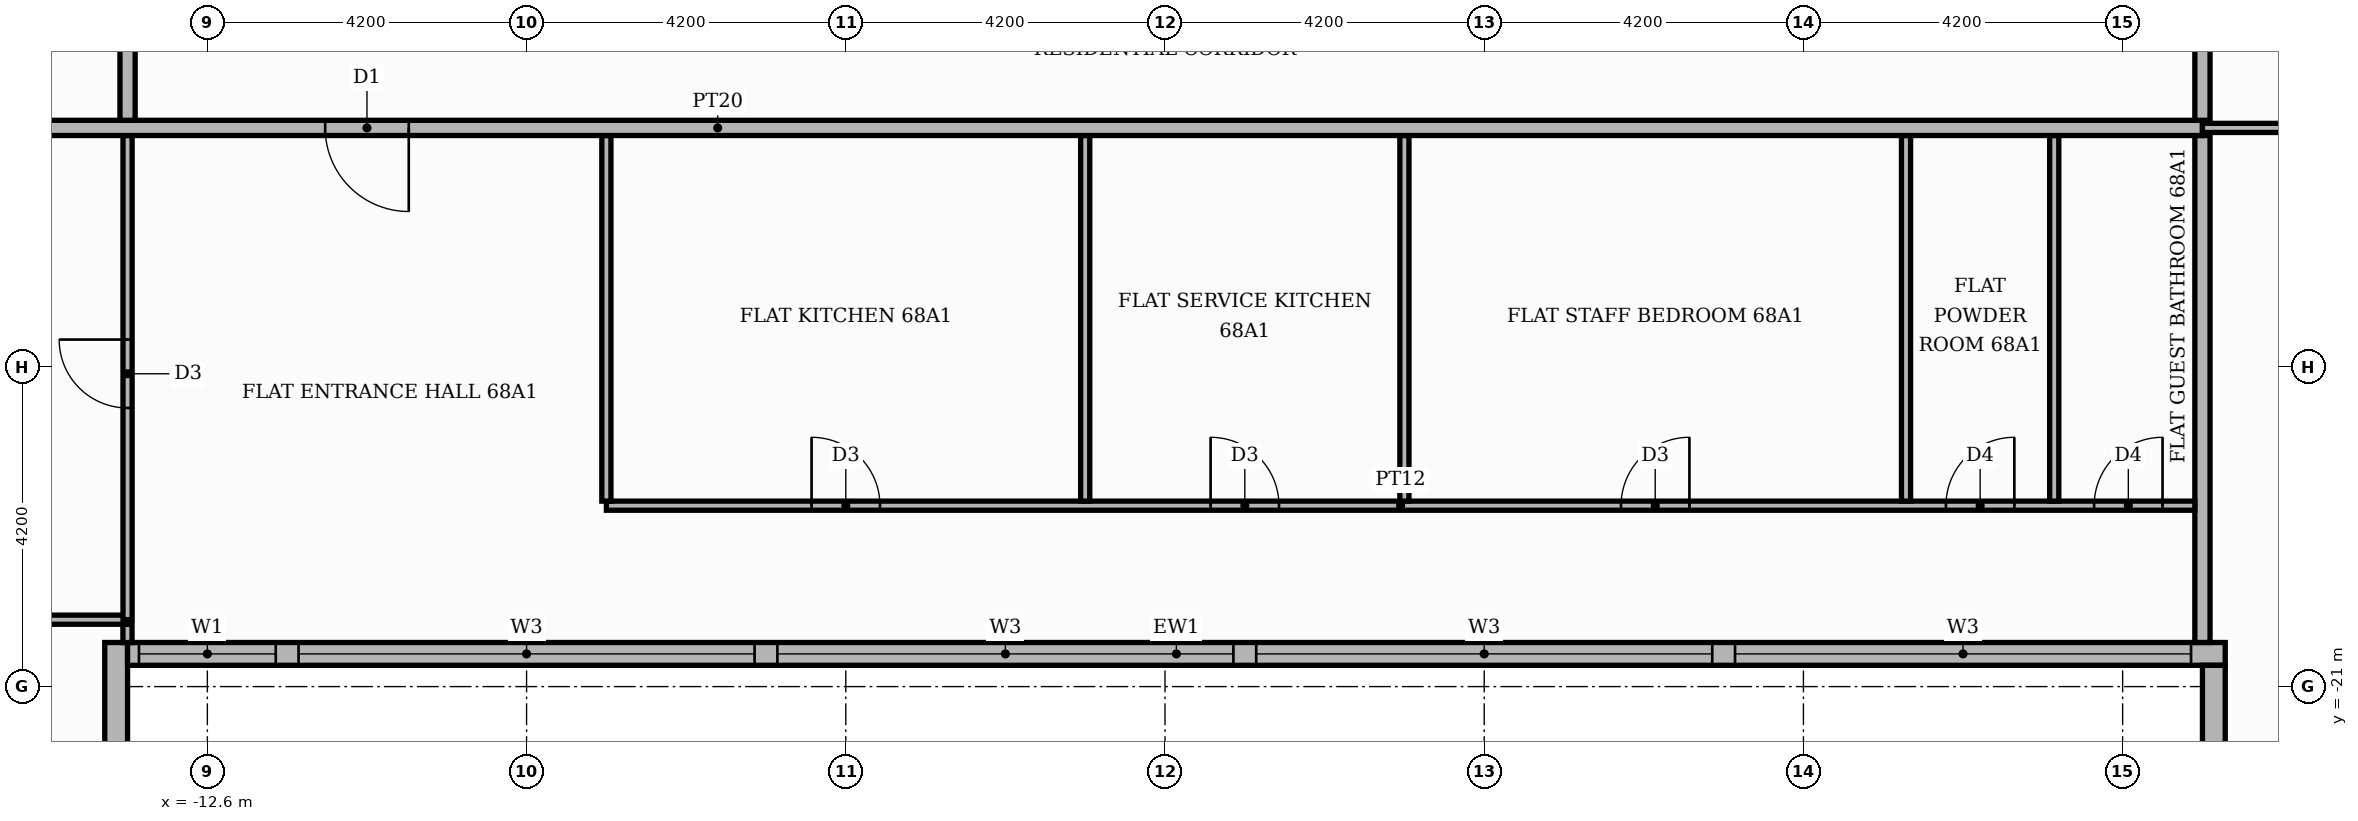
"""IFC4 building model, lengths in metres.
Left out: names, types, materials, properties, quantities, classifications, styles, units other than length and angle.
Written with IfcOpenShell. Run it as: python <this file> out.ifc"""

import sys

from ifc_helpers import new_model, si_unit, direction, frame, frame_2d, origin, place, context, subcontext, project, spatial, rectangle, extrude, element, fill, save


model = new_model("IFC4")
c1 = context("Model", 3, precision=1e-05, world=origin(), true_north=direction((0.0, 1.0)))
c2 = subcontext(c1, "Body", "Model", "MODEL_VIEW")
j1 = project(units=[si_unit("LENGTHUNIT", "METRE"), si_unit("PLANEANGLEUNIT", "RADIAN")], contexts=[c1])
p1 = place(None, origin())
s1 = spatial("IfcSite", under=j1, at=p1, CompositionType="ELEMENT")
p2 = place(p1, origin())
s2 = spatial("IfcBuilding", under=s1, at=p2, CompositionType="ELEMENT")
p3 = place(p2, frame((0.0, 0.0, 283.5)))
s3 = spatial("IfcBuildingStorey", under=s2, at=p3, CompositionType="ELEMENT", Elevation=283.5)
p4 = place(p3, frame((-13.8, -25.42, 0.0), z_axis=(0.0, 0.0, 1.0), x_axis=(0.0, 1.0, 0.0)))
e1 = element("IfcWall", 1, at=p4, inside=s3, PredefinedType="STANDARD", context=c2, shape_type="SweptSolid", body=[
    extrude(rectangle(XDim=5.0, YDim=0.3, at=frame_2d((2.5, 0.0))), origin(), (0.0, 0.0, 1.0), 3.4),
])
p5 = place(p4, frame((1.42, 0.0, 0.9)))
e2 = element("IfcOpeningElement", 2, at=p5, cuts=e1, PredefinedType="OPENING", context=c2, shape_type="SweptSolid", body=[
    extrude(rectangle(XDim=1.8, YDim=2.1, at=frame_2d((0.9, 1.05))), frame((0.0, 0.16, 0.0), z_axis=(0.0, -1.0, 0.0), x_axis=(1.0, 0.0, 0.0)), (0.0, 0.0, 1.0), 0.32),
])
p6 = place(p3, frame((-13.65, -20.57, 0.0), z_axis=(0.0, 0.0, 1.0), x_axis=(1.0, 0.0, 0.0)))
e3 = element("IfcWall", 3, at=p6, inside=s3, PredefinedType="STANDARD", context=c2, shape_type="SweptSolid", body=[
    extrude(rectangle(XDim=27.6, YDim=0.3, at=frame_2d((13.8, 0.0))), origin(), (0.0, 0.0, 1.0), 3.4),
])
p7 = place(p6, frame((0.15, 0.0, 0.9)))
e4 = element("IfcOpeningElement", 4, at=p7, cuts=e3, PredefinedType="OPENING", context=c2, shape_type="SweptSolid", body=[
    extrude(rectangle(XDim=1.8, YDim=2.1, at=frame_2d((0.9, 1.05))), frame((0.0, 0.16, 0.0), z_axis=(0.0, -1.0, 0.0), x_axis=(1.0, 0.0, 0.0)), (0.0, 0.0, 1.0), 0.32),
])
p8 = place(p6, frame((2.25, 0.0, 0.9)))
e5 = element("IfcOpeningElement", 5, at=p8, cuts=e3, PredefinedType="OPENING", context=c2, shape_type="SweptSolid", body=[
    extrude(rectangle(XDim=6.0, YDim=2.1, at=frame_2d((3.0, 1.05))), frame((0.0, 0.16, 0.0), z_axis=(0.0, -1.0, 0.0), x_axis=(1.0, 0.0, 0.0)), (0.0, 0.0, 1.0), 0.32),
])
p9 = place(p6, frame((8.55, 0.0, 0.9)))
e6 = element("IfcOpeningElement", 6, at=p9, cuts=e3, PredefinedType="OPENING", context=c2, shape_type="SweptSolid", body=[
    extrude(rectangle(XDim=6.0, YDim=2.1, at=frame_2d((3.0, 1.05))), frame((0.0, 0.16, 0.0), z_axis=(0.0, -1.0, 0.0), x_axis=(1.0, 0.0, 0.0)), (0.0, 0.0, 1.0), 0.32),
])
p10 = place(p6, frame((14.85, 0.0, 0.9)))
e7 = element("IfcOpeningElement", 7, at=p10, cuts=e3, PredefinedType="OPENING", context=c2, shape_type="SweptSolid", body=[
    extrude(rectangle(XDim=6.0, YDim=2.1, at=frame_2d((3.0, 1.05))), frame((0.0, 0.16, 0.0), z_axis=(0.0, -1.0, 0.0), x_axis=(1.0, 0.0, 0.0)), (0.0, 0.0, 1.0), 0.32),
])
p11 = place(p6, frame((21.15, 0.0, 0.9)))
e8 = element("IfcOpeningElement", 8, at=p11, cuts=e3, PredefinedType="OPENING", context=c2, shape_type="SweptSolid", body=[
    extrude(rectangle(XDim=6.0, YDim=2.1, at=frame_2d((3.0, 1.05))), frame((0.0, 0.16, 0.0), z_axis=(0.0, -1.0, 0.0), x_axis=(1.0, 0.0, 0.0)), (0.0, 0.0, 1.0), 0.32),
])
p12 = place(p3, frame((13.8, -20.72, 0.0), z_axis=(0.0, 0.0, 1.0), x_axis=(0.0, -1.0, 0.0)))
e9 = element("IfcWall", 9, at=p12, inside=s3, PredefinedType="STANDARD", context=c2, shape_type="SweptSolid", body=[
    extrude(rectangle(XDim=5.0, YDim=0.3, at=frame_2d((2.5, 0.0))), origin(), (0.0, 0.0, 1.0), 3.4),
])
p13 = place(p12, frame((1.48, 0.0, 0.9)))
e10 = element("IfcOpeningElement", 10, at=p13, cuts=e9, PredefinedType="OPENING", context=c2, shape_type="SweptSolid", body=[
    extrude(rectangle(XDim=1.8, YDim=2.1, at=frame_2d((0.9, 1.05))), frame((0.0, 0.16, 0.0), z_axis=(0.0, -1.0, 0.0), x_axis=(1.0, 0.0, 0.0)), (0.0, 0.0, 1.0), 0.32),
])
p14 = place(p3, frame((-13.651, -20.421, 0.0), z_axis=(0.0, 0.0, 1.0), x_axis=(0.0, 1.0, 0.0)))
e11 = element("IfcWall", 11, at=p14, inside=s3, PredefinedType="PARTITIONING", context=c2, shape_type="SweptSolid", body=[
    extrude(rectangle(XDim=0.241, YDim=0.12, at=frame_2d((0.121, 0.0))), origin(), (0.0, 0.0, 1.0), 3.4),
])
p15 = place(p3, frame((13.65, -20.42, 0.0), z_axis=(0.0, 0.0, 1.0), x_axis=(0.0, 1.0, 0.0)))
e12 = element("IfcWall", 12, at=p15, inside=s3, PredefinedType="PARTITIONING", context=c2, shape_type="SweptSolid", body=[
    extrude(rectangle(XDim=6.67, YDim=0.2, at=frame_2d((3.335, 0.0))), origin(), (0.0, 0.0, 1.0), 3.4),
])
p16 = place(p3, frame((-20.719, -20.12, 0.0), z_axis=(0.0, 0.0, 1.0), x_axis=(1.0, 0.0, 0.0)))
e13 = element("IfcWall", 13, at=p16, inside=s3, PredefinedType="PARTITIONING", context=c2, shape_type="SweptSolid", body=[
    extrude(rectangle(XDim=7.068, YDim=0.12, at=frame_2d((3.534, 0.0))), origin(), (0.0, 0.0, 1.0), 3.4),
])
p17 = place(p16, frame((4.094, 0.0, 0.0)))
e14 = element("IfcOpeningElement", 14, at=p17, cuts=e13, PredefinedType="OPENING", context=c2, shape_type="SweptSolid", body=[
    extrude(rectangle(XDim=1.0, YDim=2.1, at=frame_2d((0.5, 1.05))), frame((0.0, 0.07, 0.0), z_axis=(0.0, -1.0, 0.0), x_axis=(1.0, 0.0, 0.0)), (0.0, 0.0, 1.0), 0.14),
])
p18 = place(p3, frame((-13.65, -20.119, 0.0), z_axis=(0.0, 0.0, 1.0), x_axis=(0.0, 1.0, 0.0)))
e15 = element("IfcWall", 15, at=p18, inside=s3, PredefinedType="PARTITIONING", context=c2, shape_type="SweptSolid", body=[
    extrude(rectangle(XDim=6.369, YDim=0.12, at=frame_2d((3.185, 0.0))), origin(), (0.0, 0.0, 1.0), 3.4),
])
p19 = place(p18, frame((2.784, 0.0, 0.0)))
e16 = element("IfcOpeningElement", 16, at=p19, cuts=e15, PredefinedType="OPENING", context=c2, shape_type="SweptSolid", body=[
    extrude(rectangle(XDim=0.9, YDim=2.1, at=frame_2d((0.45, 1.05))), frame((0.0, 0.07, 0.0), z_axis=(0.0, -1.0, 0.0), x_axis=(1.0, 0.0, 0.0)), (0.0, 0.0, 1.0), 0.14),
])
p20 = place(p3, frame((-7.35, -18.62, 0.0), z_axis=(0.0, 0.0, 1.0), x_axis=(1.0, 0.0, 0.0)))
e17 = element("IfcWall", 17, at=p20, inside=s3, PredefinedType="PARTITIONING", context=c2, shape_type="SweptSolid", body=[
    extrude(rectangle(XDim=20.9, YDim=0.12, at=frame_2d((10.45, 0.0))), origin(), (0.0, 0.0, 1.0), 3.4),
])
p21 = place(p20, frame((2.7, 0.0, 0.0)))
e18 = element("IfcOpeningElement", 18, at=p21, cuts=e17, PredefinedType="OPENING", context=c2, shape_type="SweptSolid", body=[
    extrude(rectangle(XDim=0.9, YDim=2.1, at=frame_2d((0.45, 1.05))), frame((0.0, 0.07, 0.0), z_axis=(0.0, -1.0, 0.0), x_axis=(1.0, 0.0, 0.0)), (0.0, 0.0, 1.0), 0.14),
])
p22 = place(p20, frame((7.95, 0.0, 0.0)))
e19 = element("IfcOpeningElement", 19, at=p22, cuts=e17, PredefinedType="OPENING", context=c2, shape_type="SweptSolid", body=[
    extrude(rectangle(XDim=0.9, YDim=2.1, at=frame_2d((0.45, 1.05))), frame((0.0, 0.07, 0.0), z_axis=(0.0, -1.0, 0.0), x_axis=(1.0, 0.0, 0.0)), (0.0, 0.0, 1.0), 0.14),
])
p23 = place(p20, frame((13.35, 0.0, 0.0)))
e20 = element("IfcOpeningElement", 20, at=p23, cuts=e17, PredefinedType="OPENING", context=c2, shape_type="SweptSolid", body=[
    extrude(rectangle(XDim=0.9, YDim=2.1, at=frame_2d((0.45, 1.05))), frame((0.0, 0.07, 0.0), z_axis=(0.0, -1.0, 0.0), x_axis=(1.0, 0.0, 0.0)), (0.0, 0.0, 1.0), 0.14),
])
p24 = place(p20, frame((17.625, 0.0, 0.0)))
e21 = element("IfcOpeningElement", 21, at=p24, cuts=e17, PredefinedType="OPENING", context=c2, shape_type="SweptSolid", body=[
    extrude(rectangle(XDim=0.9, YDim=2.1, at=frame_2d((0.45, 1.05))), frame((0.0, 0.07, 0.0), z_axis=(0.0, -1.0, 0.0), x_axis=(1.0, 0.0, 0.0)), (0.0, 0.0, 1.0), 0.14),
])
p25 = place(p20, frame((19.575, 0.0, 0.0)))
e22 = element("IfcOpeningElement", 22, at=p25, cuts=e17, PredefinedType="OPENING", context=c2, shape_type="SweptSolid", body=[
    extrude(rectangle(XDim=0.9, YDim=2.1, at=frame_2d((0.45, 1.05))), frame((0.0, 0.07, 0.0), z_axis=(0.0, -1.0, 0.0), x_axis=(1.0, 0.0, 0.0)), (0.0, 0.0, 1.0), 0.14),
])
for number, where, z_axis, x_axis in (
    (23, (-7.35, -18.56, 0.0), (0.0, 0.0, 1.0), (0.0, 1.0, 0.0)),
    (24, (-1.05, -18.56, 0.0), (0.0, 0.0, 1.0), (0.0, 1.0, 0.0)),
    (25, (3.15, -18.56, 0.0), (0.0, 0.0, 1.0), (0.0, 1.0, 0.0)),
    (26, (9.75, -18.56, 0.0), (0.0, 0.0, 1.0), (0.0, 1.0, 0.0)),
    (27, (11.7, -18.56, 0.0), (0.0, 0.0, 1.0), (0.0, 1.0, 0.0)),
):
    element("IfcWall", number, at=place(p3, frame(where, z_axis=z_axis, x_axis=x_axis)), inside=s3, PredefinedType="PARTITIONING", context=c2, shape_type="SweptSolid", body=[
        extrude(rectangle(XDim=4.81, YDim=0.12, at=frame_2d((2.405, 0.0))), origin(), (0.0, 0.0, 1.0), 3.4),
    ])
p26 = place(p3, frame((-25.42, -13.65, 0.0), z_axis=(0.0, 0.0, 1.0), x_axis=(1.0, 0.0, 0.0)))
e28 = element("IfcWall", 28, at=p26, inside=s3, PredefinedType="PARTITIONING", context=c2, shape_type="SweptSolid", body=[
    extrude(rectangle(XDim=39.07, YDim=0.2, at=frame_2d((19.535, 0.0))), origin(), (0.0, 0.0, 1.0), 3.4),
])
p27 = place(p26, frame((14.37, 0.0, 0.0)))
e29 = element("IfcOpeningElement", 29, at=p27, cuts=e28, PredefinedType="OPENING", context=c2, shape_type="SweptSolid", body=[
    extrude(rectangle(XDim=1.1, YDim=2.4, at=frame_2d((0.55, 1.2))), frame((0.0, 0.11, 0.0), z_axis=(0.0, -1.0, 0.0), x_axis=(1.0, 0.0, 0.0)), (0.0, 0.0, 1.0), 0.22),
])
p28 = place(p3, frame((13.65, -13.65, 0.0), z_axis=(0.0, 0.0, 1.0), x_axis=(1.0, 0.0, 0.0)))
e30 = element("IfcWall", 30, at=p28, inside=s3, PredefinedType="PARTITIONING", context=c2, shape_type="SweptSolid", body=[
    extrude(rectangle(XDim=6.77, YDim=0.12, at=frame_2d((3.385, 0.0))), origin(), (0.0, 0.0, 1.0), 3.4),
])
p29 = place(p28, frame((2.885, 0.0, 0.0)))
e31 = element("IfcOpeningElement", 31, at=p29, cuts=e30, PredefinedType="OPENING", context=c2, shape_type="SweptSolid", body=[
    extrude(rectangle(XDim=1.0, YDim=2.1, at=frame_2d((0.5, 1.05))), frame((0.0, 0.07, 0.0), z_axis=(0.0, -1.0, 0.0), x_axis=(1.0, 0.0, 0.0)), (0.0, 0.0, 1.0), 0.14),
])
for number, where, z_axis, x_axis in (
    (32, (-13.65, -13.55, 0.0), (0.0, 0.0, 1.0), (0.0, 1.0, 0.0)),
    (33, (13.65, -13.55, 0.0), (0.0, 0.0, 1.0), (0.0, 1.0, 0.0)),
):
    element("IfcWall", number, at=place(p3, frame(where, z_axis=z_axis, x_axis=x_axis)), inside=s3, PredefinedType="PARTITIONING", context=c2, shape_type="SweptSolid", body=[
        extrude(rectangle(XDim=2.45, YDim=0.2, at=frame_2d((1.225, 0.0))), origin(), (0.0, 0.0, 1.0), 3.4),
    ])
p30 = place(p7, origin())
e34 = element("IfcWindow", 34, at=p30, inside=s3, PartitioningType="SINGLE_PANEL", PredefinedType="WINDOW", context=c2, shape_type="SweptSolid", body=[
    extrude(rectangle(XDim=1.8, YDim=2.1, at=frame_2d((0.9, 1.05))), frame((0.0, 0.03, 0.0), z_axis=(0.0, -1.0, 0.0), x_axis=(1.0, 0.0, 0.0)), (0.0, 0.0, 1.0), 0.06),
])
fill(e4, e34)
p31 = place(p8, origin())
e35 = element("IfcWindow", 35, at=p31, inside=s3, PartitioningType="SINGLE_PANEL", PredefinedType="WINDOW", context=c2, shape_type="SweptSolid", body=[
    extrude(rectangle(XDim=6.0, YDim=2.1, at=frame_2d((3.0, 1.05))), frame((0.0, 0.03, 0.0), z_axis=(0.0, -1.0, 0.0), x_axis=(1.0, 0.0, 0.0)), (0.0, 0.0, 1.0), 0.06),
])
fill(e5, e35)
p32 = place(p9, origin())
e36 = element("IfcWindow", 36, at=p32, inside=s3, PartitioningType="SINGLE_PANEL", PredefinedType="WINDOW", context=c2, shape_type="SweptSolid", body=[
    extrude(rectangle(XDim=6.0, YDim=2.1, at=frame_2d((3.0, 1.05))), frame((0.0, 0.03, 0.0), z_axis=(0.0, -1.0, 0.0), x_axis=(1.0, 0.0, 0.0)), (0.0, 0.0, 1.0), 0.06),
])
fill(e6, e36)
p33 = place(p10, origin())
e37 = element("IfcWindow", 37, at=p33, inside=s3, PartitioningType="SINGLE_PANEL", PredefinedType="WINDOW", context=c2, shape_type="SweptSolid", body=[
    extrude(rectangle(XDim=6.0, YDim=2.1, at=frame_2d((3.0, 1.05))), frame((0.0, 0.03, 0.0), z_axis=(0.0, -1.0, 0.0), x_axis=(1.0, 0.0, 0.0)), (0.0, 0.0, 1.0), 0.06),
])
fill(e7, e37)
p34 = place(p11, origin())
e38 = element("IfcWindow", 38, at=p34, inside=s3, PartitioningType="SINGLE_PANEL", PredefinedType="WINDOW", context=c2, shape_type="SweptSolid", body=[
    extrude(rectangle(XDim=6.0, YDim=2.1, at=frame_2d((3.0, 1.05))), frame((0.0, 0.03, 0.0), z_axis=(0.0, -1.0, 0.0), x_axis=(1.0, 0.0, 0.0)), (0.0, 0.0, 1.0), 0.06),
])
fill(e8, e38)
p35 = place(p27, frame((1.1, 0.0, 0.0), z_axis=(0.0, 0.0, 1.0), x_axis=(-1.0, 0.0, 0.0)))
e39 = element("IfcDoor", 39, at=p35, inside=s3, OperationType="SINGLE_SWING_RIGHT", PredefinedType="DOOR", context=c2, shape_type="SweptSolid", body=[
    extrude(rectangle(XDim=1.1, YDim=2.4, at=frame_2d((0.55, 1.2))), frame((0.0, 0.025, 0.0), z_axis=(0.0, -1.0, 0.0), x_axis=(1.0, 0.0, 0.0)), (0.0, 0.0, 1.0), 0.05),
])
fill(e29, e39)
p36 = place(p19, origin())
e40 = element("IfcDoor", 40, at=p36, inside=s3, OperationType="SINGLE_SWING_RIGHT", PredefinedType="DOOR", context=c2, shape_type="SweptSolid", body=[
    extrude(rectangle(XDim=0.9, YDim=2.1, at=frame_2d((0.45, 1.05))), frame((0.0, 0.025, 0.0), z_axis=(0.0, -1.0, 0.0), x_axis=(1.0, 0.0, 0.0)), (0.0, 0.0, 1.0), 0.05),
])
fill(e16, e40)
p37 = place(p21, origin())
e41 = element("IfcDoor", 41, at=p37, inside=s3, OperationType="SINGLE_SWING_LEFT", PredefinedType="DOOR", context=c2, shape_type="SweptSolid", body=[
    extrude(rectangle(XDim=0.9, YDim=2.1, at=frame_2d((0.45, 1.05))), frame((0.0, 0.025, 0.0), z_axis=(0.0, -1.0, 0.0), x_axis=(1.0, 0.0, 0.0)), (0.0, 0.0, 1.0), 0.05),
])
fill(e18, e41)
p38 = place(p22, origin())
e42 = element("IfcDoor", 42, at=p38, inside=s3, OperationType="SINGLE_SWING_LEFT", PredefinedType="DOOR", context=c2, shape_type="SweptSolid", body=[
    extrude(rectangle(XDim=0.9, YDim=2.1, at=frame_2d((0.45, 1.05))), frame((0.0, 0.025, 0.0), z_axis=(0.0, -1.0, 0.0), x_axis=(1.0, 0.0, 0.0)), (0.0, 0.0, 1.0), 0.05),
])
fill(e19, e42)
p39 = place(p23, origin())
e43 = element("IfcDoor", 43, at=p39, inside=s3, OperationType="SINGLE_SWING_RIGHT", PredefinedType="DOOR", context=c2, shape_type="SweptSolid", body=[
    extrude(rectangle(XDim=0.9, YDim=2.1, at=frame_2d((0.45, 1.05))), frame((0.0, 0.025, 0.0), z_axis=(0.0, -1.0, 0.0), x_axis=(1.0, 0.0, 0.0)), (0.0, 0.0, 1.0), 0.05),
])
fill(e20, e43)
p40 = place(p24, origin())
e44 = element("IfcDoor", 44, at=p40, inside=s3, OperationType="SINGLE_SWING_RIGHT", PredefinedType="DOOR", context=c2, shape_type="SweptSolid", body=[
    extrude(rectangle(XDim=0.9, YDim=2.1, at=frame_2d((0.45, 1.05))), frame((0.0, 0.025, 0.0), z_axis=(0.0, -1.0, 0.0), x_axis=(1.0, 0.0, 0.0)), (0.0, 0.0, 1.0), 0.05),
])
fill(e21, e44)
p41 = place(p25, origin())
e45 = element("IfcDoor", 45, at=p41, inside=s3, OperationType="SINGLE_SWING_RIGHT", PredefinedType="DOOR", context=c2, shape_type="SweptSolid", body=[
    extrude(rectangle(XDim=0.9, YDim=2.1, at=frame_2d((0.45, 1.05))), frame((0.0, 0.025, 0.0), z_axis=(0.0, -1.0, 0.0), x_axis=(1.0, 0.0, 0.0)), (0.0, 0.0, 1.0), 0.05),
])
fill(e22, e45)
save(model, sys.argv[1])
